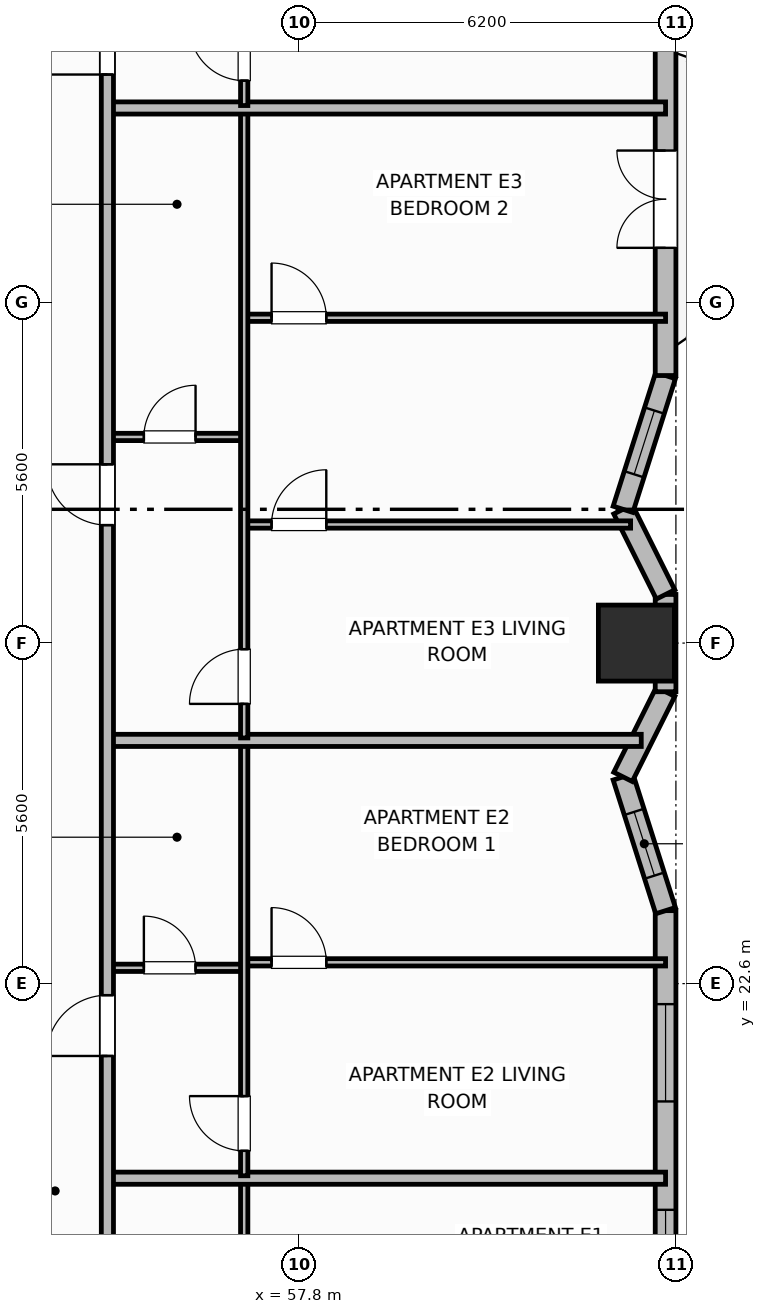
"""IFC4 building model, lengths in metres.
Left out: names, types, materials, properties, quantities, classifications, styles, units other than length and angle.
Written with IfcOpenShell. Run it as: python <this file> out.ifc"""

import sys

from ifc_helpers import new_model, si_unit, direction, frame, frame_2d, origin, origin_2d, place, context, subcontext, project, spatial, rectangle, extrude, element, fill, save


model = new_model("IFC4")
c1 = context("Model", 3, precision=1e-05, world=origin(), true_north=direction((0.0, 1.0)))
c2 = subcontext(c1, "Body", "Model", "MODEL_VIEW")
j1 = project(units=[si_unit("LENGTHUNIT", "METRE"), si_unit("PLANEANGLEUNIT", "RADIAN")], contexts=[c1])
p1 = place(None, origin())
s1 = spatial("IfcSite", under=j1, at=p1, CompositionType="ELEMENT")
p2 = place(p1, origin())
s2 = spatial("IfcBuilding", under=s1, at=p2, CompositionType="ELEMENT")
p3 = place(p2, frame((0.0, 0.0, 62.1)))
s3 = spatial("IfcBuildingStorey", under=s2, at=p3, CompositionType="ELEMENT", Elevation=62.1)
p4 = place(p3, frame((63.35, 28.2, 0.0), z_axis=(0.0, 0.0, 1.0), x_axis=(1.0, 0.0, 0.0)))
e1 = element("IfcColumn", 1, at=p4, inside=s3, PredefinedType="COLUMN", context=c2, shape_type="SweptSolid", body=[
    extrude(rectangle(XDim=1.25, YDim=1.25, at=origin_2d()), origin(), (0.0, 0.0, 1.0), 3.7),
])
p5 = place(p3, frame((63.83, 9.0, 0.0), z_axis=(0.0, 0.0, 1.0), x_axis=(0.0, 1.0, 0.0)))
e2 = element("IfcWall", 2, at=p5, inside=s3, PredefinedType="SOLIDWALL", context=c2, shape_type="SweptSolid", body=[
    extrude(rectangle(XDim=14.8, YDim=0.34, at=frame_2d((7.4, 0.0))), origin(), (0.0, 0.0, 1.0), 2.7),
])
p6 = place(p5, frame((3.863, 0.0, 0.68)))
e3 = element("IfcOpeningElement", 3, at=p6, cuts=e2, PredefinedType="OPENING", context=c2, shape_type="SweptSolid", body=[
    extrude(rectangle(XDim=1.6, YDim=1.9, at=frame_2d((0.8, 0.95))), frame((0.0, 0.18, 0.0), z_axis=(0.0, -1.0, 0.0), x_axis=(1.0, 0.0, 0.0)), (0.0, 0.0, 1.0), 0.36),
])
p7 = place(p5, frame((8.48, 0.0, 0.69)))
e4 = element("IfcOpeningElement", 4, at=p7, cuts=e2, PredefinedType="OPENING", context=c2, shape_type="SweptSolid", body=[
    extrude(rectangle(XDim=1.4, YDim=1.85, at=frame_2d((0.7, 0.925))), frame((0.0, 0.18, 0.0), z_axis=(0.0, -1.0, 0.0), x_axis=(1.0, 0.0, 0.0)), (0.0, 0.0, 1.0), 0.36),
])
p8 = place(p5, frame((11.663, 0.0, 0.68)))
e5 = element("IfcOpeningElement", 5, at=p8, cuts=e2, PredefinedType="OPENING", context=c2, shape_type="SweptSolid", body=[
    extrude(rectangle(XDim=1.6, YDim=1.9, at=frame_2d((0.8, 0.95))), frame((0.0, 0.18, 0.0), z_axis=(0.0, -1.0, 0.0), x_axis=(1.0, 0.0, 0.0)), (0.0, 0.0, 1.0), 0.36),
])
p9 = place(p3, frame((63.83, 23.8, 0.0), z_axis=(0.0, 0.0, 1.0), x_axis=(-0.303286588318, 0.95289938889, 0.0)))
e6 = element("IfcWall", 6, at=p9, inside=s3, PredefinedType="SOLIDWALL", context=c2, shape_type="SweptSolid", body=[
    extrude(rectangle(XDim=2.309, YDim=0.34, at=frame_2d((1.154, 0.0))), origin(), (0.0, 0.0, 1.0), 2.7),
])
p10 = place(p9, frame((0.604, 0.0, 0.89)))
e7 = element("IfcOpeningElement", 7, at=p10, cuts=e6, PredefinedType="OPENING", context=c2, shape_type="SweptSolid", body=[
    extrude(rectangle(XDim=1.1, YDim=1.65, at=frame_2d((0.55, 0.825))), frame((0.0, 0.18, 0.0), z_axis=(0.0, -1.0, 0.0), x_axis=(1.0, 0.0, 0.0)), (0.0, 0.0, 1.0), 0.36),
])
p11 = place(p3, frame((63.13, 26.0, 0.0), z_axis=(0.0, 0.0, 1.0), x_axis=(0.447338371726, 0.894364792007, 0.0)))
e8 = element("IfcWall", 8, at=p11, inside=s3, PredefinedType="SOLIDWALL", context=c2, shape_type="SweptSolid", body=[
    extrude(rectangle(XDim=1.565, YDim=0.34, at=frame_2d((0.783, 0.0))), origin(), (0.0, 0.0, 1.0), 2.7),
])
p12 = place(p3, frame((63.83, 27.4, 0.0), z_axis=(0.0, 0.0, 1.0), x_axis=(0.0, 1.0, 0.0)))
e9 = element("IfcWall", 9, at=p12, inside=s3, PredefinedType="SOLIDWALL", context=c2, shape_type="SweptSolid", body=[
    extrude(rectangle(XDim=1.6, YDim=0.34, at=frame_2d((0.8, 0.0))), origin(), (0.0, 0.0, 1.0), 2.7),
])
p13 = place(p3, frame((63.83, 29.0, 0.0), z_axis=(0.0, 0.0, 1.0), x_axis=(-0.447338371726, 0.894364792007, 0.0)))
e10 = element("IfcWall", 10, at=p13, inside=s3, PredefinedType="SOLIDWALL", context=c2, shape_type="SweptSolid", body=[
    extrude(rectangle(XDim=1.565, YDim=0.34, at=frame_2d((0.783, 0.0))), origin(), (0.0, 0.0, 1.0), 2.7),
])
p14 = place(p3, frame((63.13, 30.4, 0.0), z_axis=(0.0, 0.0, 1.0), x_axis=(0.303256029766, 0.952909114454, 0.0)))
e11 = element("IfcWall", 11, at=p14, inside=s3, PredefinedType="SOLIDWALL", context=c2, shape_type="SweptSolid", body=[
    extrude(rectangle(XDim=2.309, YDim=0.34, at=frame_2d((1.154, 0.0))), origin(), (0.0, 0.0, 1.0), 2.7),
])
p15 = place(p14, frame((0.604, 0.0, 0.89)))
e12 = element("IfcOpeningElement", 12, at=p15, cuts=e11, PredefinedType="OPENING", context=c2, shape_type="SweptSolid", body=[
    extrude(rectangle(XDim=1.1, YDim=1.65, at=frame_2d((0.55, 0.825))), frame((0.0, 0.18, 0.0), z_axis=(0.0, -1.0, 0.0), x_axis=(1.0, 0.0, 0.0)), (0.0, 0.0, 1.0), 0.36),
])
p16 = place(p3, frame((63.83, 32.6, 0.0), z_axis=(0.0, 0.0, 1.0), x_axis=(0.0, 1.0, 0.0)))
e13 = element("IfcWall", 13, at=p16, inside=s3, PredefinedType="SOLIDWALL", context=c2, shape_type="SweptSolid", body=[
    extrude(rectangle(XDim=14.8, YDim=0.34, at=frame_2d((7.4, 0.0))), origin(), (0.0, 0.0, 1.0), 2.7),
])
p17 = place(p16, frame((2.1, 0.0, 0.0)))
e14 = element("IfcOpeningElement", 14, at=p17, cuts=e13, PredefinedType="OPENING", context=c2, shape_type="SweptSolid", body=[
    extrude(rectangle(XDim=1.6, YDim=2.1, at=frame_2d((0.8, 1.05))), frame((0.0, 0.18, 0.0), z_axis=(0.0, -1.0, 0.0), x_axis=(1.0, 0.0, 0.0)), (0.0, 0.0, 1.0), 0.36),
])
p18 = place(p16, frame((9.438, 0.0, 0.73)))
e15 = element("IfcOpeningElement", 15, at=p18, cuts=e13, PredefinedType="OPENING", context=c2, shape_type="SweptSolid", body=[
    extrude(rectangle(XDim=1.4, YDim=1.85, at=frame_2d((0.7, 0.925))), frame((0.0, 0.18, 0.0), z_axis=(0.0, -1.0, 0.0), x_axis=(1.0, 0.0, 0.0)), (0.0, 0.0, 1.0), 0.36),
])
p19 = place(p3, frame((56.9, 10.64, 0.0), z_axis=(0.0, 0.0, 1.0), x_axis=(0.0, 1.0, 0.0)))
e16 = element("IfcWall", 16, at=p19, inside=s3, PredefinedType="PARTITIONING", context=c2, shape_type="SweptSolid", body=[
    extrude(rectangle(XDim=8.72, YDim=0.12, at=frame_2d((4.36, 0.0))), origin(), (0.0, 0.0, 1.0), 2.53),
])
p20 = place(p19, frame((0.41, 0.0, 0.0)))
e17 = element("IfcOpeningElement", 17, at=p20, cuts=e16, PredefinedType="OPENING", context=c2, shape_type="SweptSolid", body=[
    extrude(rectangle(XDim=0.9, YDim=2.1, at=frame_2d((0.45, 1.05))), frame((0.0, 0.07, 0.0), z_axis=(0.0, -1.0, 0.0), x_axis=(1.0, 0.0, 0.0)), (0.0, 0.0, 1.0), 0.14),
])
p21 = place(p3, frame((54.65, 19.4, 0.0), z_axis=(0.0, 0.0, 1.0), x_axis=(1.0, 0.0, 0.0)))
e18 = element("IfcWall", 18, at=p21, inside=s3, PredefinedType="PARTITIONING", context=c2, shape_type="SweptSolid", body=[
    extrude(rectangle(XDim=9.18, YDim=0.2, at=frame_2d((4.59, 0.0))), origin(), (0.0, 0.0, 1.0), 2.53),
])
p22 = place(p3, frame((54.65, 22.86, 0.0), z_axis=(0.0, 0.0, 1.0), x_axis=(1.0, 0.0, 0.0)))
e19 = element("IfcWall", 19, at=p22, inside=s3, PredefinedType="PARTITIONING", context=c2, shape_type="SweptSolid", body=[
    extrude(rectangle(XDim=2.25, YDim=0.12, at=frame_2d((1.125, 0.0))), origin(), (0.0, 0.0, 1.0), 2.53),
])
p23 = place(p22, frame((0.6, 0.0, 0.0)))
e20 = element("IfcOpeningElement", 20, at=p23, cuts=e19, PredefinedType="OPENING", context=c2, shape_type="SweptSolid", body=[
    extrude(rectangle(XDim=0.85, YDim=2.1, at=frame_2d((0.425, 1.05))), frame((0.0, 0.07, 0.0), z_axis=(0.0, -1.0, 0.0), x_axis=(1.0, 0.0, 0.0)), (0.0, 0.0, 1.0), 0.14),
])
p24 = place(p3, frame((56.9, 22.95, 0.0), z_axis=(0.0, 0.0, 1.0), x_axis=(1.0, 0.0, 0.0)))
e21 = element("IfcWall", 21, at=p24, inside=s3, PredefinedType="PARTITIONING", context=c2, shape_type="SweptSolid", body=[
    extrude(rectangle(XDim=6.93, YDim=0.12, at=frame_2d((3.465, 0.0))), origin(), (0.0, 0.0, 1.0), 2.53),
])
p25 = place(p24, frame((0.45, 0.0, 0.0)))
e22 = element("IfcOpeningElement", 22, at=p25, cuts=e21, PredefinedType="OPENING", context=c2, shape_type="SweptSolid", body=[
    extrude(rectangle(XDim=0.9, YDim=2.1, at=frame_2d((0.45, 1.05))), frame((0.0, 0.07, 0.0), z_axis=(0.0, -1.0, 0.0), x_axis=(1.0, 0.0, 0.0)), (0.0, 0.0, 1.0), 0.14),
])
p26 = place(p3, frame((56.9, 19.44, 0.0), z_axis=(0.0, 0.0, 1.0), x_axis=(0.0, 1.0, 0.0)))
e23 = element("IfcWall", 23, at=p26, inside=s3, PredefinedType="PARTITIONING", context=c2, shape_type="SweptSolid", body=[
    extrude(rectangle(XDim=7.12, YDim=0.12, at=frame_2d((3.56, 0.0))), origin(), (0.0, 0.0, 1.0), 2.53),
])
p27 = place(p26, frame((0.41, 0.0, 0.0)))
e24 = element("IfcOpeningElement", 24, at=p27, cuts=e23, PredefinedType="OPENING", context=c2, shape_type="SweptSolid", body=[
    extrude(rectangle(XDim=0.9, YDim=2.1, at=frame_2d((0.45, 1.05))), frame((0.0, 0.07, 0.0), z_axis=(0.0, -1.0, 0.0), x_axis=(1.0, 0.0, 0.0)), (0.0, 0.0, 1.0), 0.14),
])
p28 = place(p3, frame((54.65, 26.6, 0.0), z_axis=(0.0, 0.0, 1.0), x_axis=(1.0, 0.0, 0.0)))
e25 = element("IfcWall", 25, at=p28, inside=s3, PredefinedType="PARTITIONING", context=c2, shape_type="SweptSolid", body=[
    extrude(rectangle(XDim=8.78, YDim=0.2, at=frame_2d((4.39, 0.0))), origin(), (0.0, 0.0, 1.0), 2.53),
])
p29 = place(p3, frame((54.65, 31.59, 0.0), z_axis=(0.0, 0.0, 1.0), x_axis=(1.0, 0.0, 0.0)))
e26 = element("IfcWall", 26, at=p29, inside=s3, PredefinedType="PARTITIONING", context=c2, shape_type="SweptSolid", body=[
    extrude(rectangle(XDim=2.25, YDim=0.12, at=frame_2d((1.125, 0.0))), origin(), (0.0, 0.0, 1.0), 2.53),
])
p30 = place(p29, frame((0.6, 0.0, 0.0)))
e27 = element("IfcOpeningElement", 27, at=p30, cuts=e26, PredefinedType="OPENING", context=c2, shape_type="SweptSolid", body=[
    extrude(rectangle(XDim=0.85, YDim=2.1, at=frame_2d((0.425, 1.05))), frame((0.0, 0.07, 0.0), z_axis=(0.0, -1.0, 0.0), x_axis=(1.0, 0.0, 0.0)), (0.0, 0.0, 1.0), 0.14),
])
p31 = place(p3, frame((56.9, 30.15, 0.0), z_axis=(0.0, 0.0, 1.0), x_axis=(1.0, 0.0, 0.0)))
e28 = element("IfcWall", 28, at=p31, inside=s3, PredefinedType="PARTITIONING", context=c2, shape_type="SweptSolid", body=[
    extrude(rectangle(XDim=6.355, YDim=0.12, at=frame_2d((3.177, 0.0))), origin(), (0.0, 0.0, 1.0), 2.53),
])
p32 = place(p31, frame((0.45, 0.0, 0.0)))
e29 = element("IfcOpeningElement", 29, at=p32, cuts=e28, PredefinedType="OPENING", context=c2, shape_type="SweptSolid", body=[
    extrude(rectangle(XDim=0.9, YDim=2.1, at=frame_2d((0.45, 1.05))), frame((0.0, 0.07, 0.0), z_axis=(0.0, -1.0, 0.0), x_axis=(1.0, 0.0, 0.0)), (0.0, 0.0, 1.0), 0.14),
])
p33 = place(p3, frame((56.9, 33.55, 0.0), z_axis=(0.0, 0.0, 1.0), x_axis=(1.0, 0.0, 0.0)))
e30 = element("IfcWall", 30, at=p33, inside=s3, PredefinedType="PARTITIONING", context=c2, shape_type="SweptSolid", body=[
    extrude(rectangle(XDim=6.93, YDim=0.12, at=frame_2d((3.465, 0.0))), origin(), (0.0, 0.0, 1.0), 2.53),
])
p34 = place(p33, frame((0.45, 0.0, 0.0)))
e31 = element("IfcOpeningElement", 31, at=p34, cuts=e30, PredefinedType="OPENING", context=c2, shape_type="SweptSolid", body=[
    extrude(rectangle(XDim=0.9, YDim=2.1, at=frame_2d((0.45, 1.05))), frame((0.0, 0.07, 0.0), z_axis=(0.0, -1.0, 0.0), x_axis=(1.0, 0.0, 0.0)), (0.0, 0.0, 1.0), 0.14),
])
p35 = place(p3, frame((56.9, 26.64, 0.0), z_axis=(0.0, 0.0, 1.0), x_axis=(0.0, 1.0, 0.0)))
e32 = element("IfcWall", 32, at=p35, inside=s3, PredefinedType="PARTITIONING", context=c2, shape_type="SweptSolid", body=[
    extrude(rectangle(XDim=10.32, YDim=0.12, at=frame_2d((5.16, 0.0))), origin(), (0.0, 0.0, 1.0), 2.53),
])
p36 = place(p35, frame((0.56, 0.0, 0.0)))
e33 = element("IfcOpeningElement", 33, at=p36, cuts=e32, PredefinedType="OPENING", context=c2, shape_type="SweptSolid", body=[
    extrude(rectangle(XDim=0.9, YDim=2.1, at=frame_2d((0.45, 1.05))), frame((0.0, 0.07, 0.0), z_axis=(0.0, -1.0, 0.0), x_axis=(1.0, 0.0, 0.0)), (0.0, 0.0, 1.0), 0.14),
])
p37 = place(p3, frame((54.65, 37.0, 0.0), z_axis=(0.0, 0.0, 1.0), x_axis=(1.0, 0.0, 0.0)))
e34 = element("IfcWall", 34, at=p37, inside=s3, PredefinedType="PARTITIONING", context=c2, shape_type="SweptSolid", body=[
    extrude(rectangle(XDim=9.18, YDim=0.2, at=frame_2d((4.59, 0.0))), origin(), (0.0, 0.0, 1.0), 2.53),
])
p38 = place(p3, frame((56.9, 37.04, 0.0), z_axis=(0.0, 0.0, 1.0), x_axis=(0.0, 1.0, 0.0)))
e35 = element("IfcWall", 35, at=p38, inside=s3, PredefinedType="PARTITIONING", context=c2, shape_type="SweptSolid", body=[
    extrude(rectangle(XDim=8.72, YDim=0.12, at=frame_2d((4.36, 0.0))), origin(), (0.0, 0.0, 1.0), 2.53),
])
p39 = place(p38, frame((0.41, 0.0, 0.0)))
e36 = element("IfcOpeningElement", 36, at=p39, cuts=e35, PredefinedType="OPENING", context=c2, shape_type="SweptSolid", body=[
    extrude(rectangle(XDim=0.9, YDim=2.1, at=frame_2d((0.45, 1.05))), frame((0.0, 0.07, 0.0), z_axis=(0.0, -1.0, 0.0), x_axis=(1.0, 0.0, 0.0)), (0.0, 0.0, 1.0), 0.14),
])
p40 = place(p3, frame((54.65, 10.6, 0.0), z_axis=(0.0, 0.0, 1.0), x_axis=(0.0, 1.0, 0.0)))
e37 = element("IfcWall", 37, at=p40, inside=s3, PredefinedType="PARTITIONING", context=c2, shape_type="SweptSolid", body=[
    extrude(rectangle(XDim=35.2, YDim=0.2, at=frame_2d((17.6, 0.0))), origin(), (0.0, 0.0, 1.0), 2.53),
])
p41 = place(p40, frame((2.65, 0.0, 0.0)))
e38 = element("IfcOpeningElement", 38, at=p41, cuts=e37, PredefinedType="OPENING", context=c2, shape_type="SweptSolid", body=[
    extrude(rectangle(XDim=1.0, YDim=2.15, at=frame_2d((0.5, 1.075))), frame((0.0, 0.11, 0.0), z_axis=(0.0, -1.0, 0.0), x_axis=(1.0, 0.0, 0.0)), (0.0, 0.0, 1.0), 0.22),
])
p42 = place(p40, frame((10.81, 0.0, 0.0)))
e39 = element("IfcOpeningElement", 39, at=p42, cuts=e37, PredefinedType="OPENING", context=c2, shape_type="SweptSolid", body=[
    extrude(rectangle(XDim=1.0, YDim=2.15, at=frame_2d((0.5, 1.075))), frame((0.0, 0.11, 0.0), z_axis=(0.0, -1.0, 0.0), x_axis=(1.0, 0.0, 0.0)), (0.0, 0.0, 1.0), 0.22),
])
p43 = place(p40, frame((19.54, 0.0, 0.0)))
e40 = element("IfcOpeningElement", 40, at=p43, cuts=e37, PredefinedType="OPENING", context=c2, shape_type="SweptSolid", body=[
    extrude(rectangle(XDim=1.0, YDim=2.15, at=frame_2d((0.5, 1.075))), frame((0.0, 0.11, 0.0), z_axis=(0.0, -1.0, 0.0), x_axis=(1.0, 0.0, 0.0)), (0.0, 0.0, 1.0), 0.22),
])
p44 = place(p40, frame((26.95, 0.0, 0.0)))
e41 = element("IfcOpeningElement", 41, at=p44, cuts=e37, PredefinedType="OPENING", context=c2, shape_type="SweptSolid", body=[
    extrude(rectangle(XDim=1.0, YDim=2.15, at=frame_2d((0.5, 1.075))), frame((0.0, 0.11, 0.0), z_axis=(0.0, -1.0, 0.0), x_axis=(1.0, 0.0, 0.0)), (0.0, 0.0, 1.0), 0.22),
])
p45 = place(p7, origin())
e42 = element("IfcWindow", 42, at=p45, inside=s3, PartitioningType="SINGLE_PANEL", PredefinedType="WINDOW", context=c2, shape_type="SweptSolid", body=[
    extrude(rectangle(XDim=1.4, YDim=1.85, at=frame_2d((0.7, 0.925))), frame((0.0, 0.03, 0.0), z_axis=(0.0, -1.0, 0.0), x_axis=(1.0, 0.0, 0.0)), (0.0, 0.0, 1.0), 0.06),
])
fill(e4, e42)
p46 = place(p8, origin())
e43 = element("IfcWindow", 43, at=p46, inside=s3, PartitioningType="SINGLE_PANEL", PredefinedType="WINDOW", context=c2, shape_type="SweptSolid", body=[
    extrude(rectangle(XDim=1.6, YDim=1.9, at=frame_2d((0.8, 0.95))), frame((0.0, 0.03, 0.0), z_axis=(0.0, -1.0, 0.0), x_axis=(1.0, 0.0, 0.0)), (0.0, 0.0, 1.0), 0.06),
])
fill(e5, e43)
p47 = place(p10, origin())
e44 = element("IfcWindow", 44, at=p47, inside=s3, PartitioningType="SINGLE_PANEL", PredefinedType="WINDOW", context=c2, shape_type="SweptSolid", body=[
    extrude(rectangle(XDim=1.1, YDim=1.65, at=frame_2d((0.55, 0.825))), frame((0.0, 0.03, 0.0), z_axis=(0.0, -1.0, 0.0), x_axis=(1.0, 0.0, 0.0)), (0.0, 0.0, 1.0), 0.06),
])
fill(e7, e44)
p48 = place(p15, origin())
e45 = element("IfcWindow", 45, at=p48, inside=s3, PartitioningType="SINGLE_PANEL", PredefinedType="WINDOW", context=c2, shape_type="SweptSolid", body=[
    extrude(rectangle(XDim=1.1, YDim=1.65, at=frame_2d((0.55, 0.825))), frame((0.0, 0.03, 0.0), z_axis=(0.0, -1.0, 0.0), x_axis=(1.0, 0.0, 0.0)), (0.0, 0.0, 1.0), 0.06),
])
fill(e12, e45)
p49 = place(p17, origin())
e46 = element("IfcDoor", 46, at=p49, inside=s3, OperationType="DOUBLE_DOOR_SINGLE_SWING", PredefinedType="DOOR", context=c2, shape_type="SweptSolid", body=[
    extrude(rectangle(XDim=1.6, YDim=2.1, at=frame_2d((0.8, 1.05))), frame((0.0, 0.025, 0.0), z_axis=(0.0, -1.0, 0.0), x_axis=(1.0, 0.0, 0.0)), (0.0, 0.0, 1.0), 0.05),
])
fill(e14, e46)
p50 = place(p23, origin())
e47 = element("IfcDoor", 47, at=p50, inside=s3, OperationType="SINGLE_SWING_LEFT", PredefinedType="DOOR", context=c2, shape_type="SweptSolid", body=[
    extrude(rectangle(XDim=0.85, YDim=2.1, at=frame_2d((0.425, 1.05))), frame((0.0, 0.025, 0.0), z_axis=(0.0, -1.0, 0.0), x_axis=(1.0, 0.0, 0.0)), (0.0, 0.0, 1.0), 0.05),
])
fill(e20, e47)
p51 = place(p25, origin())
e48 = element("IfcDoor", 48, at=p51, inside=s3, OperationType="SINGLE_SWING_LEFT", PredefinedType="DOOR", context=c2, shape_type="SweptSolid", body=[
    extrude(rectangle(XDim=0.9, YDim=2.1, at=frame_2d((0.45, 1.05))), frame((0.0, 0.025, 0.0), z_axis=(0.0, -1.0, 0.0), x_axis=(1.0, 0.0, 0.0)), (0.0, 0.0, 1.0), 0.05),
])
fill(e22, e48)
p52 = place(p27, origin())
e49 = element("IfcDoor", 49, at=p52, inside=s3, OperationType="SINGLE_SWING_RIGHT", PredefinedType="DOOR", context=c2, shape_type="SweptSolid", body=[
    extrude(rectangle(XDim=0.9, YDim=2.1, at=frame_2d((0.45, 1.05))), frame((0.0, 0.025, 0.0), z_axis=(0.0, -1.0, 0.0), x_axis=(1.0, 0.0, 0.0)), (0.0, 0.0, 1.0), 0.05),
])
fill(e24, e49)
p53 = place(p30, origin())
e50 = element("IfcDoor", 50, at=p53, inside=s3, OperationType="SINGLE_SWING_RIGHT", PredefinedType="DOOR", context=c2, shape_type="SweptSolid", body=[
    extrude(rectangle(XDim=0.85, YDim=2.1, at=frame_2d((0.425, 1.05))), frame((0.0, 0.025, 0.0), z_axis=(0.0, -1.0, 0.0), x_axis=(1.0, 0.0, 0.0)), (0.0, 0.0, 1.0), 0.05),
])
fill(e27, e50)
p54 = place(p32, origin())
e51 = element("IfcDoor", 51, at=p54, inside=s3, OperationType="SINGLE_SWING_RIGHT", PredefinedType="DOOR", context=c2, shape_type="SweptSolid", body=[
    extrude(rectangle(XDim=0.9, YDim=2.1, at=frame_2d((0.45, 1.05))), frame((0.0, 0.025, 0.0), z_axis=(0.0, -1.0, 0.0), x_axis=(1.0, 0.0, 0.0)), (0.0, 0.0, 1.0), 0.05),
])
fill(e29, e51)
p55 = place(p34, origin())
e52 = element("IfcDoor", 52, at=p55, inside=s3, OperationType="SINGLE_SWING_LEFT", PredefinedType="DOOR", context=c2, shape_type="SweptSolid", body=[
    extrude(rectangle(XDim=0.9, YDim=2.1, at=frame_2d((0.45, 1.05))), frame((0.0, 0.025, 0.0), z_axis=(0.0, -1.0, 0.0), x_axis=(1.0, 0.0, 0.0)), (0.0, 0.0, 1.0), 0.05),
])
fill(e31, e52)
p56 = place(p36, origin())
e53 = element("IfcDoor", 53, at=p56, inside=s3, OperationType="SINGLE_SWING_LEFT", PredefinedType="DOOR", context=c2, shape_type="SweptSolid", body=[
    extrude(rectangle(XDim=0.9, YDim=2.1, at=frame_2d((0.45, 1.05))), frame((0.0, 0.025, 0.0), z_axis=(0.0, -1.0, 0.0), x_axis=(1.0, 0.0, 0.0)), (0.0, 0.0, 1.0), 0.05),
])
fill(e33, e53)
p57 = place(p39, origin())
e54 = element("IfcDoor", 54, at=p57, inside=s3, OperationType="SINGLE_SWING_RIGHT", PredefinedType="DOOR", context=c2, shape_type="SweptSolid", body=[
    extrude(rectangle(XDim=0.9, YDim=2.1, at=frame_2d((0.45, 1.05))), frame((0.0, 0.025, 0.0), z_axis=(0.0, -1.0, 0.0), x_axis=(1.0, 0.0, 0.0)), (0.0, 0.0, 1.0), 0.05),
])
fill(e36, e54)
p58 = place(p42, origin())
e55 = element("IfcDoor", 55, at=p58, inside=s3, OperationType="SINGLE_SWING_LEFT", PredefinedType="DOOR", context=c2, shape_type="SweptSolid", body=[
    extrude(rectangle(XDim=1.0, YDim=2.15, at=frame_2d((0.5, 1.075))), frame((0.0, 0.025, 0.0), z_axis=(0.0, -1.0, 0.0), x_axis=(1.0, 0.0, 0.0)), (0.0, 0.0, 1.0), 0.05),
])
fill(e39, e55)
p59 = place(p43, origin())
e56 = element("IfcDoor", 56, at=p59, inside=s3, OperationType="SINGLE_SWING_RIGHT", PredefinedType="DOOR", context=c2, shape_type="SweptSolid", body=[
    extrude(rectangle(XDim=1.0, YDim=2.15, at=frame_2d((0.5, 1.075))), frame((0.0, 0.025, 0.0), z_axis=(0.0, -1.0, 0.0), x_axis=(1.0, 0.0, 0.0)), (0.0, 0.0, 1.0), 0.05),
])
fill(e40, e56)
p60 = place(p44, origin())
e57 = element("IfcDoor", 57, at=p60, inside=s3, OperationType="SINGLE_SWING_LEFT", PredefinedType="DOOR", context=c2, shape_type="SweptSolid", body=[
    extrude(rectangle(XDim=1.0, YDim=2.15, at=frame_2d((0.5, 1.075))), frame((0.0, 0.025, 0.0), z_axis=(0.0, -1.0, 0.0), x_axis=(1.0, 0.0, 0.0)), (0.0, 0.0, 1.0), 0.05),
])
fill(e41, e57)
save(model, sys.argv[1])
